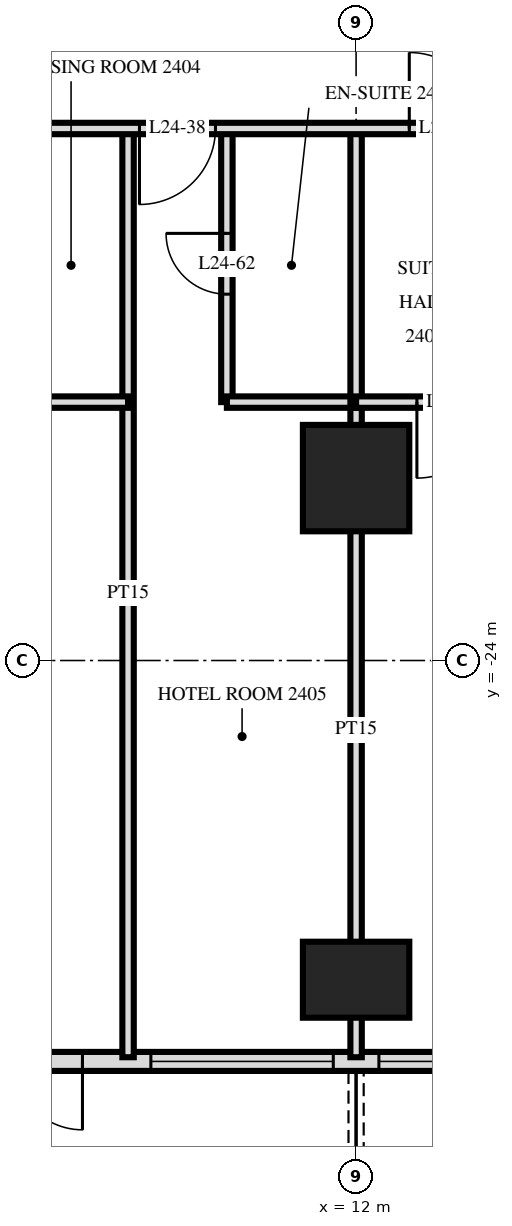
"""IFC4 building model, lengths in metres.
Left out: names, types, materials, properties, quantities, classifications, styles, units other than length and angle.
Written with IfcOpenShell. Run it as: python <this file> out.ifc"""

import sys

from ifc_helpers import new_model, si_unit, direction, frame, frame_2d, origin, origin_2d, place, context, subcontext, project, spatial, rectangle, extrude, element, fill, save


model = new_model("IFC4")
c1 = context("Model", 3, precision=1e-05, world=origin(), true_north=direction((0.0, 1.0)))
c2 = subcontext(c1, "Body", "Model", "MODEL_VIEW")
j1 = project(units=[si_unit("LENGTHUNIT", "METRE"), si_unit("PLANEANGLEUNIT", "RADIAN")], contexts=[c1])
p1 = place(None, origin())
s1 = spatial("IfcSite", under=j1, at=p1, CompositionType="ELEMENT")
p2 = place(p1, origin())
s2 = spatial("IfcBuilding", under=s1, at=p2, CompositionType="ELEMENT")
p3 = place(p2, frame((0.0, 0.0, 96.0)))
s3 = spatial("IfcBuildingStorey", under=s2, at=p3, CompositionType="ELEMENT", Elevation=96.0)
p4 = place(p3, frame((12.0, -28.2, 0.0), z_axis=(0.0, 0.0, 1.0), x_axis=(1.0, 0.0, 0.0)))
e1 = element("IfcColumn", 1, at=p4, inside=s3, PredefinedType="COLUMN", context=c2, shape_type="SweptSolid", body=[
    extrude(rectangle(XDim=1.4, YDim=1.0, at=origin_2d()), origin(), (0.0, 0.0, 1.0), 3.6),
])
p5 = place(p3, frame((12.0, -21.6, 0.0), z_axis=(0.0, 0.0, 1.0), x_axis=(1.0, 0.0, 0.0)))
e2 = element("IfcColumn", 2, at=p5, inside=s3, PredefinedType="COLUMN", context=c2, shape_type="SweptSolid", body=[
    extrude(rectangle(XDim=1.4, YDim=1.4, at=origin_2d()), origin(), (0.0, 0.0, 1.0), 3.6),
])
p6 = place(p3, frame((-28.775, -29.275, 0.0), z_axis=(0.0, 0.0, 1.0), x_axis=(1.0, 0.0, 0.0)))
e3 = element("IfcWall", 3, at=p6, inside=s3, PredefinedType="SOLIDWALL", context=c2, shape_type="SweptSolid", body=[
    extrude(rectangle(XDim=57.551, YDim=0.25, at=frame_2d((28.775, 0.0))), origin(), (0.0, 0.0, 1.0), 3.32),
])
p7 = place(p6, frame((0.575, 0.0, 0.0)))
e4 = element("IfcOpeningElement", 4, at=p7, cuts=e3, PredefinedType="OPENING", context=c2, shape_type="SweptSolid", body=[
    extrude(rectangle(XDim=1.8, YDim=2.4, at=frame_2d((0.9, 1.2))), frame((0.0, 0.135, 0.0), z_axis=(0.0, -1.0, 0.0), x_axis=(1.0, 0.0, 0.0)), (0.0, 0.0, 1.0), 0.27),
])
p8 = place(p6, frame((5.075, 0.0, 0.3)))
e5 = element("IfcOpeningElement", 5, at=p8, cuts=e3, PredefinedType="OPENING", context=c2, shape_type="SweptSolid", body=[
    extrude(rectangle(XDim=2.4, YDim=2.1, at=frame_2d((1.2, 1.05))), frame((0.0, 0.135, 0.0), z_axis=(0.0, -1.0, 0.0), x_axis=(1.0, 0.0, 0.0)), (0.0, 0.0, 1.0), 0.27),
])
p9 = place(p6, frame((8.375, 0.0, 0.0)))
e6 = element("IfcOpeningElement", 6, at=p9, cuts=e3, PredefinedType="OPENING", context=c2, shape_type="SweptSolid", body=[
    extrude(rectangle(XDim=1.8, YDim=2.4, at=frame_2d((0.9, 1.2))), frame((0.0, 0.135, 0.0), z_axis=(0.0, -1.0, 0.0), x_axis=(1.0, 0.0, 0.0)), (0.0, 0.0, 1.0), 0.27),
])
p10 = place(p6, frame((11.375, 0.0, 0.0)))
e7 = element("IfcOpeningElement", 7, at=p10, cuts=e3, PredefinedType="OPENING", context=c2, shape_type="SweptSolid", body=[
    extrude(rectangle(XDim=1.8, YDim=2.4, at=frame_2d((0.9, 1.2))), frame((0.0, 0.135, 0.0), z_axis=(0.0, -1.0, 0.0), x_axis=(1.0, 0.0, 0.0)), (0.0, 0.0, 1.0), 0.27),
])
p11 = place(p6, frame((14.075, 0.0, 0.3)))
e8 = element("IfcOpeningElement", 8, at=p11, cuts=e3, PredefinedType="OPENING", context=c2, shape_type="SweptSolid", body=[
    extrude(rectangle(XDim=2.4, YDim=2.1, at=frame_2d((1.2, 1.05))), frame((0.0, 0.135, 0.0), z_axis=(0.0, -1.0, 0.0), x_axis=(1.0, 0.0, 0.0)), (0.0, 0.0, 1.0), 0.27),
])
p12 = place(p6, frame((17.375, 0.0, 0.0)))
e9 = element("IfcOpeningElement", 9, at=p12, cuts=e3, PredefinedType="OPENING", context=c2, shape_type="SweptSolid", body=[
    extrude(rectangle(XDim=1.8, YDim=2.4, at=frame_2d((0.9, 1.2))), frame((0.0, 0.135, 0.0), z_axis=(0.0, -1.0, 0.0), x_axis=(1.0, 0.0, 0.0)), (0.0, 0.0, 1.0), 0.27),
])
p13 = place(p6, frame((20.075, 0.0, 0.3)))
e10 = element("IfcOpeningElement", 10, at=p13, cuts=e3, PredefinedType="OPENING", context=c2, shape_type="SweptSolid", body=[
    extrude(rectangle(XDim=2.4, YDim=2.1, at=frame_2d((1.2, 1.05))), frame((0.0, 0.135, 0.0), z_axis=(0.0, -1.0, 0.0), x_axis=(1.0, 0.0, 0.0)), (0.0, 0.0, 1.0), 0.27),
])
p14 = place(p6, frame((23.075, 0.0, 0.3)))
e11 = element("IfcOpeningElement", 11, at=p14, cuts=e3, PredefinedType="OPENING", context=c2, shape_type="SweptSolid", body=[
    extrude(rectangle(XDim=2.4, YDim=2.1, at=frame_2d((1.2, 1.05))), frame((0.0, 0.135, 0.0), z_axis=(0.0, -1.0, 0.0), x_axis=(1.0, 0.0, 0.0)), (0.0, 0.0, 1.0), 0.27),
])
p15 = place(p6, frame((26.375, 0.0, 0.0)))
e12 = element("IfcOpeningElement", 12, at=p15, cuts=e3, PredefinedType="OPENING", context=c2, shape_type="SweptSolid", body=[
    extrude(rectangle(XDim=1.8, YDim=2.4, at=frame_2d((0.9, 1.2))), frame((0.0, 0.135, 0.0), z_axis=(0.0, -1.0, 0.0), x_axis=(1.0, 0.0, 0.0)), (0.0, 0.0, 1.0), 0.27),
])
p16 = place(p6, frame((29.375, 0.0, 0.0)))
e13 = element("IfcOpeningElement", 13, at=p16, cuts=e3, PredefinedType="OPENING", context=c2, shape_type="SweptSolid", body=[
    extrude(rectangle(XDim=1.8, YDim=2.4, at=frame_2d((0.9, 1.2))), frame((0.0, 0.135, 0.0), z_axis=(0.0, -1.0, 0.0), x_axis=(1.0, 0.0, 0.0)), (0.0, 0.0, 1.0), 0.27),
])
p17 = place(p6, frame((32.075, 0.0, 0.3)))
e14 = element("IfcOpeningElement", 14, at=p17, cuts=e3, PredefinedType="OPENING", context=c2, shape_type="SweptSolid", body=[
    extrude(rectangle(XDim=2.4, YDim=2.1, at=frame_2d((1.2, 1.05))), frame((0.0, 0.135, 0.0), z_axis=(0.0, -1.0, 0.0), x_axis=(1.0, 0.0, 0.0)), (0.0, 0.0, 1.0), 0.27),
])
p18 = place(p6, frame((35.375, 0.0, 0.0)))
e15 = element("IfcOpeningElement", 15, at=p18, cuts=e3, PredefinedType="OPENING", context=c2, shape_type="SweptSolid", body=[
    extrude(rectangle(XDim=1.8, YDim=2.4, at=frame_2d((0.9, 1.2))), frame((0.0, 0.135, 0.0), z_axis=(0.0, -1.0, 0.0), x_axis=(1.0, 0.0, 0.0)), (0.0, 0.0, 1.0), 0.27),
])
p19 = place(p6, frame((38.075, 0.0, 0.3)))
e16 = element("IfcOpeningElement", 16, at=p19, cuts=e3, PredefinedType="OPENING", context=c2, shape_type="SweptSolid", body=[
    extrude(rectangle(XDim=2.4, YDim=2.1, at=frame_2d((1.2, 1.05))), frame((0.0, 0.135, 0.0), z_axis=(0.0, -1.0, 0.0), x_axis=(1.0, 0.0, 0.0)), (0.0, 0.0, 1.0), 0.27),
])
p20 = place(p6, frame((41.075, 0.0, 0.3)))
e17 = element("IfcOpeningElement", 17, at=p20, cuts=e3, PredefinedType="OPENING", context=c2, shape_type="SweptSolid", body=[
    extrude(rectangle(XDim=2.4, YDim=2.1, at=frame_2d((1.2, 1.05))), frame((0.0, 0.135, 0.0), z_axis=(0.0, -1.0, 0.0), x_axis=(1.0, 0.0, 0.0)), (0.0, 0.0, 1.0), 0.27),
])
p21 = place(p6, frame((44.375, 0.0, 0.0)))
e18 = element("IfcOpeningElement", 18, at=p21, cuts=e3, PredefinedType="OPENING", context=c2, shape_type="SweptSolid", body=[
    extrude(rectangle(XDim=1.8, YDim=2.4, at=frame_2d((0.9, 1.2))), frame((0.0, 0.135, 0.0), z_axis=(0.0, -1.0, 0.0), x_axis=(1.0, 0.0, 0.0)), (0.0, 0.0, 1.0), 0.27),
])
p22 = place(p6, frame((47.075, 0.0, 0.3)))
e19 = element("IfcOpeningElement", 19, at=p22, cuts=e3, PredefinedType="OPENING", context=c2, shape_type="SweptSolid", body=[
    extrude(rectangle(XDim=2.4, YDim=2.1, at=frame_2d((1.2, 1.05))), frame((0.0, 0.135, 0.0), z_axis=(0.0, -1.0, 0.0), x_axis=(1.0, 0.0, 0.0)), (0.0, 0.0, 1.0), 0.27),
])
p23 = place(p6, frame((50.375, 0.0, 0.0)))
e20 = element("IfcOpeningElement", 20, at=p23, cuts=e3, PredefinedType="OPENING", context=c2, shape_type="SweptSolid", body=[
    extrude(rectangle(XDim=1.8, YDim=2.4, at=frame_2d((0.9, 1.2))), frame((0.0, 0.135, 0.0), z_axis=(0.0, -1.0, 0.0), x_axis=(1.0, 0.0, 0.0)), (0.0, 0.0, 1.0), 0.27),
])
p24 = place(p6, frame((53.375, 0.0, 0.0)))
e21 = element("IfcOpeningElement", 21, at=p24, cuts=e3, PredefinedType="OPENING", context=c2, shape_type="SweptSolid", body=[
    extrude(rectangle(XDim=1.8, YDim=2.4, at=frame_2d((0.9, 1.2))), frame((0.0, 0.135, 0.0), z_axis=(0.0, -1.0, 0.0), x_axis=(1.0, 0.0, 0.0)), (0.0, 0.0, 1.0), 0.27),
])
p25 = place(p3, frame((12.0, -20.6, 0.0), z_axis=(0.0, 0.0, 1.0), x_axis=(0.0, 1.0, 0.0)))
e22 = element("IfcWall", 22, at=p25, inside=s3, PredefinedType="PARTITIONING", context=c2, shape_type="SweptSolid", body=[
    extrude(rectangle(XDim=3.6, YDim=0.15, at=frame_2d((1.8, 0.0))), origin(), (0.0, 0.0, 1.0), 3.32),
])
p26 = place(p3, frame((12.0, -29.22, 0.0), z_axis=(0.0, 0.0, 1.0), x_axis=(0.0, 1.0, 0.0)))
e23 = element("IfcWall", 23, at=p26, inside=s3, PredefinedType="PARTITIONING", context=c2, shape_type="SweptSolid", body=[
    extrude(rectangle(XDim=8.62, YDim=0.15, at=frame_2d((4.31, 0.0))), origin(), (0.0, 0.0, 1.0), 3.32),
])
p27 = place(p3, frame((10.3, -20.6, 0.0), z_axis=(0.0, 0.0, 1.0), x_axis=(0.0, 1.0, 0.0)))
e24 = element("IfcWall", 24, at=p27, inside=s3, PredefinedType="PARTITIONING", context=c2, shape_type="SweptSolid", body=[
    extrude(rectangle(XDim=3.6, YDim=0.15, at=frame_2d((1.8, 0.0))), origin(), (0.0, 0.0, 1.0), 3.32),
])
p28 = place(p27, frame((1.42, 0.0, 0.0)))
e25 = element("IfcOpeningElement", 25, at=p28, cuts=e24, PredefinedType="OPENING", context=c2, shape_type="SweptSolid", body=[
    extrude(rectangle(XDim=0.8, YDim=2.1, at=frame_2d((0.4, 1.05))), frame((0.0, 0.085, 0.0), z_axis=(0.0, -1.0, 0.0), x_axis=(1.0, 0.0, 0.0)), (0.0, 0.0, 1.0), 0.17),
])
p29 = place(p3, frame((9.0, -29.22, 0.0), z_axis=(0.0, 0.0, 1.0), x_axis=(0.0, 1.0, 0.0)))
e26 = element("IfcWall", 26, at=p29, inside=s3, PredefinedType="PARTITIONING", context=c2, shape_type="SweptSolid", body=[
    extrude(rectangle(XDim=12.22, YDim=0.15, at=frame_2d((6.11, 0.0))), origin(), (0.0, 0.0, 1.0), 3.32),
])
p30 = place(p3, frame((12.0, -20.6, 0.0), z_axis=(0.0, 0.0, 1.0), x_axis=(1.0, 0.0, 0.0)))
e27 = element("IfcWall", 27, at=p30, inside=s3, PredefinedType="PARTITIONING", context=c2, shape_type="SweptSolid", body=[
    extrude(rectangle(XDim=2.4, YDim=0.15, at=frame_2d((1.2, 0.0))), origin(), (0.0, 0.0, 1.0), 3.32),
])
p31 = place(p30, frame((0.8, 0.0, 0.0)))
e28 = element("IfcOpeningElement", 28, at=p31, cuts=e27, PredefinedType="OPENING", context=c2, shape_type="SweptSolid", body=[
    extrude(rectangle(XDim=1.0, YDim=2.1, at=frame_2d((0.5, 1.05))), frame((0.0, 0.085, 0.0), z_axis=(0.0, -1.0, 0.0), x_axis=(1.0, 0.0, 0.0)), (0.0, 0.0, 1.0), 0.17),
])
p32 = place(p3, frame((7.5, -20.6, 0.0), z_axis=(0.0, 0.0, 1.0), x_axis=(1.0, 0.0, 0.0)))
e29 = element("IfcWall", 29, at=p32, inside=s3, PredefinedType="PARTITIONING", context=c2, shape_type="SweptSolid", body=[
    extrude(rectangle(XDim=1.5, YDim=0.15, at=frame_2d((0.75, 0.0))), origin(), (0.0, 0.0, 1.0), 3.32),
])
p33 = place(p3, frame((10.3, -20.6, 0.0), z_axis=(0.0, 0.0, 1.0), x_axis=(1.0, 0.0, 0.0)))
e30 = element("IfcWall", 30, at=p33, inside=s3, PredefinedType="PARTITIONING", context=c2, shape_type="SweptSolid", body=[
    extrude(rectangle(XDim=1.7, YDim=0.15, at=frame_2d((0.85, 0.0))), origin(), (0.0, 0.0, 1.0), 3.32),
])
p34 = place(p3, frame((-33.12, -17.0, 0.0), z_axis=(0.0, 0.0, 1.0), x_axis=(1.0, 0.0, 0.0)))
e31 = element("IfcWall", 31, at=p34, inside=s3, PredefinedType="PARTITIONING", context=c2, shape_type="SweptSolid", body=[
    extrude(rectangle(XDim=66.24, YDim=0.15, at=frame_2d((33.12, 0.0))), origin(), (0.0, 0.0, 1.0), 3.32),
])
p35 = place(p34, frame((16.27, 0.0, 0.0)))
e32 = element("IfcOpeningElement", 32, at=p35, cuts=e31, PredefinedType="OPENING", context=c2, shape_type="SweptSolid", body=[
    extrude(rectangle(XDim=1.0, YDim=2.1, at=frame_2d((0.5, 1.05))), frame((0.0, 0.085, 0.0), z_axis=(0.0, -1.0, 0.0), x_axis=(1.0, 0.0, 0.0)), (0.0, 0.0, 1.0), 0.17),
])
p36 = place(p34, frame((22.97, 0.0, 0.0)))
e33 = element("IfcOpeningElement", 33, at=p36, cuts=e31, PredefinedType="OPENING", context=c2, shape_type="SweptSolid", body=[
    extrude(rectangle(XDim=1.0, YDim=2.1, at=frame_2d((0.5, 1.05))), frame((0.0, 0.085, 0.0), z_axis=(0.0, -1.0, 0.0), x_axis=(1.0, 0.0, 0.0)), (0.0, 0.0, 1.0), 0.17),
])
p37 = place(p34, frame((34.42, 0.0, 0.0)))
e34 = element("IfcOpeningElement", 34, at=p37, cuts=e31, PredefinedType="OPENING", context=c2, shape_type="SweptSolid", body=[
    extrude(rectangle(XDim=1.0, YDim=2.1, at=frame_2d((0.5, 1.05))), frame((0.0, 0.085, 0.0), z_axis=(0.0, -1.0, 0.0), x_axis=(1.0, 0.0, 0.0)), (0.0, 0.0, 1.0), 0.17),
])
p38 = place(p34, frame((39.22, 0.0, 0.0)))
e35 = element("IfcOpeningElement", 35, at=p38, cuts=e31, PredefinedType="OPENING", context=c2, shape_type="SweptSolid", body=[
    extrude(rectangle(XDim=1.0, YDim=2.1, at=frame_2d((0.5, 1.05))), frame((0.0, 0.085, 0.0), z_axis=(0.0, -1.0, 0.0), x_axis=(1.0, 0.0, 0.0)), (0.0, 0.0, 1.0), 0.17),
])
p39 = place(p34, frame((42.27, 0.0, 0.0)))
e36 = element("IfcOpeningElement", 36, at=p39, cuts=e31, PredefinedType="OPENING", context=c2, shape_type="SweptSolid", body=[
    extrude(rectangle(XDim=1.0, YDim=2.1, at=frame_2d((0.5, 1.05))), frame((0.0, 0.085, 0.0), z_axis=(0.0, -1.0, 0.0), x_axis=(1.0, 0.0, 0.0)), (0.0, 0.0, 1.0), 0.17),
])
p40 = place(p34, frame((45.82, 0.0, 0.0)))
e37 = element("IfcOpeningElement", 37, at=p40, cuts=e31, PredefinedType="OPENING", context=c2, shape_type="SweptSolid", body=[
    extrude(rectangle(XDim=1.0, YDim=2.1, at=frame_2d((0.5, 1.05))), frame((0.0, 0.085, 0.0), z_axis=(0.0, -1.0, 0.0), x_axis=(1.0, 0.0, 0.0)), (0.0, 0.0, 1.0), 0.17),
])
p41 = place(p34, frame((13.42, 0.0, 0.0)))
e38 = element("IfcOpeningElement", 38, at=p41, cuts=e31, PredefinedType="OPENING", context=c2, shape_type="SweptSolid", body=[
    extrude(rectangle(XDim=1.0, YDim=2.1, at=frame_2d((0.5, 1.05))), frame((0.0, 0.085, 0.0), z_axis=(0.0, -1.0, 0.0), x_axis=(1.0, 0.0, 0.0)), (0.0, 0.0, 1.0), 0.17),
])
p42 = place(p34, frame((54.82, 0.0, 0.0)))
e39 = element("IfcOpeningElement", 39, at=p42, cuts=e31, PredefinedType="OPENING", context=c2, shape_type="SweptSolid", body=[
    extrude(rectangle(XDim=1.0, YDim=2.1, at=frame_2d((0.5, 1.05))), frame((0.0, 0.085, 0.0), z_axis=(0.0, -1.0, 0.0), x_axis=(1.0, 0.0, 0.0)), (0.0, 0.0, 1.0), 0.17),
])
p43 = place(p18, frame((0.9, 0.0, 0.0), z_axis=(0.0, 0.0, 1.0), x_axis=(-1.0, 0.0, 0.0)))
e40 = element("IfcDoor", 40, at=p43, inside=s3, OperationType="DOUBLE_DOOR_SINGLE_SWING", PredefinedType="DOOR", context=c2, shape_type="SweptSolid", body=[
    extrude(rectangle(XDim=1.8, YDim=2.4, at=frame_2d((0.0, 1.2))), frame((0.0, -0.025, 0.0), z_axis=(0.0, 1.0, 0.0), x_axis=(-1.0, 0.0, 0.0)), (0.0, 0.0, 1.0), 0.05),
])
fill(e15, e40)
p44 = place(p19, origin())
e41 = element("IfcWindow", 41, at=p44, inside=s3, PartitioningType="SINGLE_PANEL", PredefinedType="WINDOW", context=c2, shape_type="SweptSolid", body=[
    extrude(rectangle(XDim=2.4, YDim=2.1, at=frame_2d((1.2, 1.05))), frame((0.0, 0.03, 0.0), z_axis=(0.0, -1.0, 0.0), x_axis=(1.0, 0.0, 0.0)), (0.0, 0.0, 1.0), 0.06),
])
fill(e16, e41)
p45 = place(p20, origin())
e42 = element("IfcWindow", 42, at=p45, inside=s3, PartitioningType="SINGLE_PANEL", PredefinedType="WINDOW", context=c2, shape_type="SweptSolid", body=[
    extrude(rectangle(XDim=2.4, YDim=2.1, at=frame_2d((1.2, 1.05))), frame((0.0, 0.03, 0.0), z_axis=(0.0, -1.0, 0.0), x_axis=(1.0, 0.0, 0.0)), (0.0, 0.0, 1.0), 0.06),
])
fill(e17, e42)
p46 = place(p39, frame((0.5, 0.0, 0.0), z_axis=(0.0, 0.0, 1.0), x_axis=(-1.0, 0.0, 0.0)))
e43 = element("IfcDoor", 43, at=p46, inside=s3, OperationType="SINGLE_SWING_LEFT", PredefinedType="DOOR", context=c2, shape_type="SweptSolid", body=[
    extrude(rectangle(XDim=1.0, YDim=2.1, at=frame_2d((0.0, 1.05))), frame((0.0, -0.025, 0.0), z_axis=(0.0, 1.0, 0.0), x_axis=(-1.0, 0.0, 0.0)), (0.0, 0.0, 1.0), 0.05),
])
fill(e36, e43)
p47 = place(p40, origin())
e44 = element("IfcDoor", 44, at=p47, inside=s3, OperationType="SINGLE_SWING_RIGHT", PredefinedType="DOOR", context=c2, shape_type="SweptSolid", body=[
    extrude(rectangle(XDim=1.0, YDim=2.1, at=frame_2d((0.5, 1.05))), frame((0.0, 0.025, 0.0), z_axis=(0.0, -1.0, 0.0), x_axis=(1.0, 0.0, 0.0)), (0.0, 0.0, 1.0), 0.05),
])
fill(e37, e44)
p48 = place(p28, origin())
e45 = element("IfcDoor", 45, at=p48, inside=s3, OperationType="SINGLE_SWING_LEFT", PredefinedType="DOOR", context=c2, shape_type="SweptSolid", body=[
    extrude(rectangle(XDim=0.8, YDim=2.1, at=frame_2d((0.4, 1.05))), frame((0.0, 0.025, 0.0), z_axis=(0.0, -1.0, 0.0), x_axis=(1.0, 0.0, 0.0)), (0.0, 0.0, 1.0), 0.05),
])
fill(e25, e45)
p49 = place(p31, frame((0.5, 0.0, 0.0), z_axis=(0.0, 0.0, 1.0), x_axis=(-1.0, 0.0, 0.0)))
e46 = element("IfcDoor", 46, at=p49, inside=s3, OperationType="SINGLE_SWING_LEFT", PredefinedType="DOOR", context=c2, shape_type="SweptSolid", body=[
    extrude(rectangle(XDim=1.0, YDim=2.1, at=frame_2d((0.0, 1.05))), frame((0.0, -0.025, 0.0), z_axis=(0.0, 1.0, 0.0), x_axis=(-1.0, 0.0, 0.0)), (0.0, 0.0, 1.0), 0.05),
])
fill(e28, e46)
save(model, sys.argv[1])
